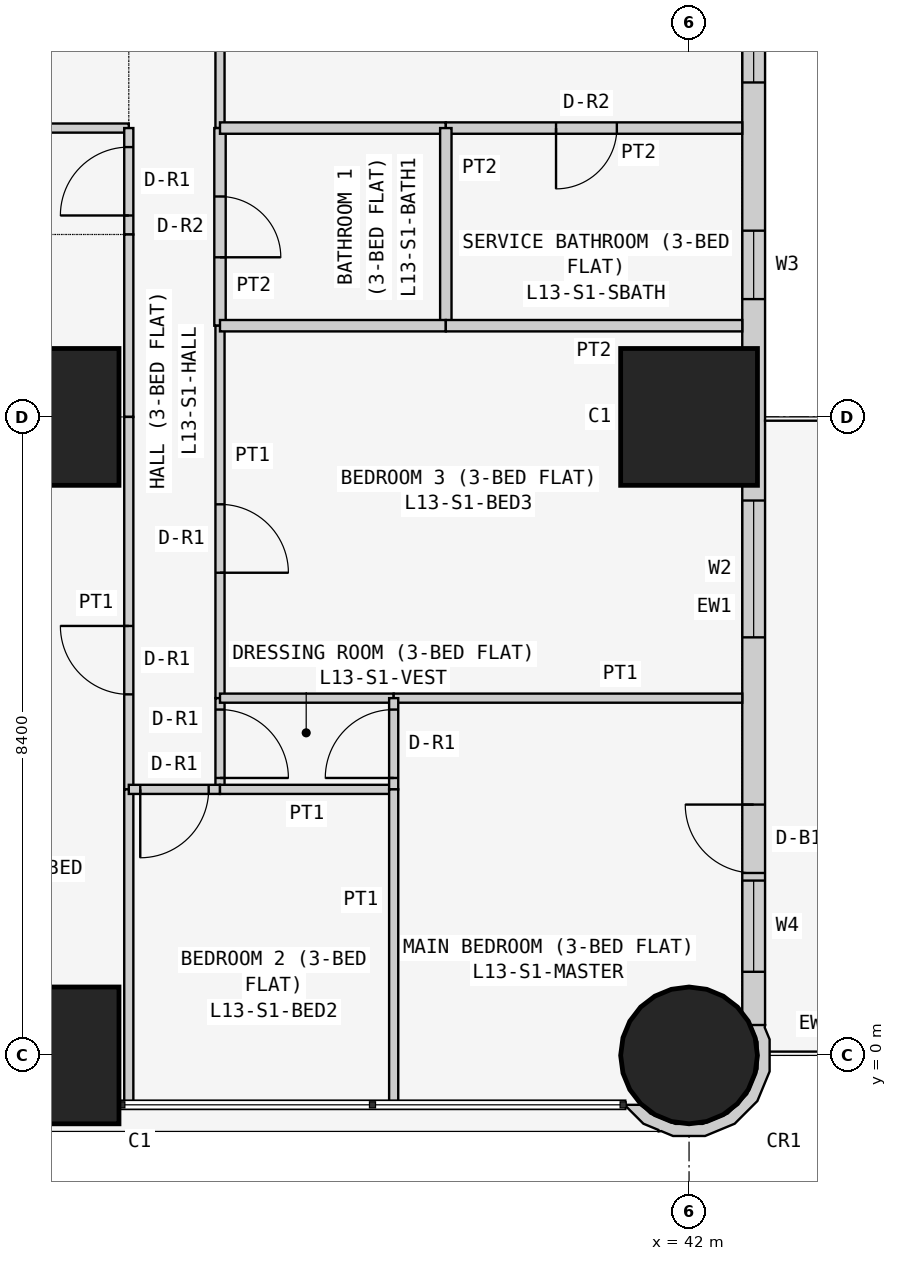
"""IFC4 building model, lengths in metres.
Left out: names, types, materials, properties, quantities, classifications, styles, units other than length and angle.
Written with IfcOpenShell. Run it as: python <this file> out.ifc"""

import sys

from ifc_helpers import new_model, si_unit, direction, frame, frame_2d, origin, origin_2d, place, context, subcontext, project, spatial, polyline, rectangle, circle, outline, extrude, element, fill, save


model = new_model("IFC4")
c1 = context("Model", 3, precision=1e-05, world=origin(), true_north=direction((0.0, 1.0)))
c2 = subcontext(c1, "Body", "Model", "MODEL_VIEW")
j1 = project(units=[si_unit("LENGTHUNIT", "METRE"), si_unit("PLANEANGLEUNIT", "RADIAN")], contexts=[c1])
p1 = place(None, origin())
s1 = spatial("IfcSite", under=j1, at=p1, CompositionType="ELEMENT")
p2 = place(p1, origin())
s2 = spatial("IfcBuilding", under=s1, at=p2, CompositionType="ELEMENT")
p3 = place(p2, frame((0.0, 0.0, 56.1)))
s3 = spatial("IfcBuildingStorey", under=s2, at=p3, CompositionType="ELEMENT", Elevation=56.1)
for number, where, z_axis, x_axis in (
    (1, (33.6, 0.0, 0.0), (0.0, 0.0, 1.0), (1.0, 0.0, 0.0)),
    (2, (33.6, 8.4, 0.0), (0.0, 0.0, 1.0), (1.0, 0.0, 0.0)),
):
    element("IfcColumn", number, at=place(p3, frame(where, z_axis=z_axis, x_axis=x_axis)), inside=s3, PredefinedType="COLUMN", context=c2, shape_type="SweptSolid", body=[
        extrude(rectangle(XDim=1.8, YDim=1.8, at=origin_2d()), origin(), (0.0, 0.0, 1.0), 3.6),
    ])
p4 = place(p3, frame((42.0, 0.0, 0.0), z_axis=(0.0, 0.0, 1.0), x_axis=(1.0, 0.0, 0.0)))
e3 = element("IfcColumn", 3, at=p4, inside=s3, PredefinedType="COLUMN", context=c2, shape_type="SweptSolid", body=[
    extrude(circle(Radius=0.9, at=origin_2d()), origin(), (0.0, 0.0, 1.0), 3.6),
])
p5 = place(p3, frame((42.0, 8.4, 0.0), z_axis=(0.0, 0.0, 1.0), x_axis=(1.0, 0.0, 0.0)))
e4 = element("IfcColumn", 4, at=p5, inside=s3, PredefinedType="COLUMN", context=c2, shape_type="SweptSolid", body=[
    extrude(rectangle(XDim=1.8, YDim=1.8, at=origin_2d()), origin(), (0.0, 0.0, 1.0), 3.6),
])
p6 = place(p3, frame((42.85, 0.4, 0.0), z_axis=(0.0, 0.0, 1.0), x_axis=(0.0, 1.0, 0.0)))
e5 = element("IfcWall", 5, at=p6, inside=s3, PredefinedType="SOLIDWALL", context=c2, shape_type="SweptSolid", body=[
    extrude(rectangle(XDim=15.7, YDim=0.3, at=frame_2d((7.85, 0.0))), origin(), (0.0, 0.0, 1.0), 3.45),
])
p7 = place(p6, frame((12.4, 0.0, 0.9)))
e6 = element("IfcOpeningElement", 6, at=p7, cuts=e5, PredefinedType="OPENING", context=c2, shape_type="SweptSolid", body=[
    extrude(rectangle(XDim=1.8, YDim=1.5, at=frame_2d((0.9, 0.75))), frame((0.0, 0.16, 0.0), z_axis=(0.0, -1.0, 0.0), x_axis=(1.0, 0.0, 0.0)), (0.0, 0.0, 1.0), 0.32),
])
p8 = place(p6, frame((9.55, 0.0, 1.5)))
e7 = element("IfcOpeningElement", 7, at=p8, cuts=e5, PredefinedType="OPENING", context=c2, shape_type="SweptSolid", body=[
    extrude(rectangle(XDim=0.9, YDim=0.7, at=frame_2d((0.45, 0.35))), frame((0.0, 0.16, 0.0), z_axis=(0.0, -1.0, 0.0), x_axis=(1.0, 0.0, 0.0)), (0.0, 0.0, 1.0), 0.32),
])
p9 = place(p6, frame((5.1, 0.0, 0.9)))
e8 = element("IfcOpeningElement", 8, at=p9, cuts=e5, PredefinedType="OPENING", context=c2, shape_type="SweptSolid", body=[
    extrude(rectangle(XDim=1.8, YDim=1.5, at=frame_2d((0.9, 0.75))), frame((0.0, 0.16, 0.0), z_axis=(0.0, -1.0, 0.0), x_axis=(1.0, 0.0, 0.0)), (0.0, 0.0, 1.0), 0.32),
])
p10 = place(p6, frame((2.0, 0.0, 0.0)))
e9 = element("IfcOpeningElement", 9, at=p10, cuts=e5, PredefinedType="OPENING", context=c2, shape_type="SweptSolid", body=[
    extrude(rectangle(XDim=0.9, YDim=2.4, at=frame_2d((0.45, 1.2))), frame((0.0, 0.16, 0.0), z_axis=(0.0, -1.0, 0.0), x_axis=(1.0, 0.0, 0.0)), (0.0, 0.0, 1.0), 0.32),
])
p11 = place(p6, frame((0.7, 0.0, 0.9)))
e10 = element("IfcOpeningElement", 10, at=p11, cuts=e5, PredefinedType="OPENING", context=c2, shape_type="SweptSolid", body=[
    extrude(rectangle(XDim=1.2, YDim=1.5, at=frame_2d((0.6, 0.75))), frame((0.0, 0.16, 0.0), z_axis=(0.0, -1.0, 0.0), x_axis=(1.0, 0.0, 0.0)), (0.0, 0.0, 1.0), 0.32),
])
p12 = place(p3, frame((41.233, -0.611, 0.0), z_axis=(0.0, 0.0, 1.0), x_axis=(0.377204953059, -0.926129809145, 0.0)))
e11 = element("IfcWall", 11, at=p12, inside=s3, PredefinedType="SOLIDWALL", context=c2, shape_type="SweptSolid", body=[
    extrude(outline(polyline([(0.319, 1.843), (-0.072, 2.001), (-0.24, 2.001), (-0.269, 2.017), (-0.37, 1.841), (-0.102, 1.842), (0.23, 1.707), (0.485, 1.455), (0.624, 1.125), (0.626, 0.766), (0.49, 0.434), (0.239, 0.179), (0.09, 0.117), (0.011, -0.078), (0.024, -0.083), (0.33, 0.045), (0.48, 0.197), (0.499, 0.193), (0.508, 0.225), (0.626, 0.345), (0.785, 0.736), (0.782, 1.157), (0.619, 1.546), (0.319, 1.843)])), origin(), (0.0, 0.0, 1.0), 3.45),
])
p13 = place(p3, frame((29.4, 12.2, 0.0), z_axis=(0.0, 0.0, 1.0), x_axis=(1.0, 0.0, 0.0)))
e12 = element("IfcWall", 12, at=p13, inside=s3, PredefinedType="PARTITIONING", context=c2, shape_type="SweptSolid", body=[
    extrude(rectangle(XDim=5.229, YDim=0.12, at=frame_2d((2.615, 0.0))), origin(), (0.0, 0.0, 1.0), 3.45),
])
p14 = place(p3, frame((34.629, 10.8, 0.0), z_axis=(0.0, 0.0, 1.0), x_axis=(0.0, 1.0, 0.0)))
e13 = element("IfcWall", 13, at=p14, inside=s3, PredefinedType="PARTITIONING", context=c2, shape_type="SweptSolid", body=[
    extrude(rectangle(XDim=1.4, YDim=0.12, at=frame_2d((0.7, 0.0))), origin(), (0.0, 0.0, 1.0), 3.45),
])
p15 = place(p14, frame((0.25, 0.0, 0.0)))
e14 = element("IfcOpeningElement", 14, at=p15, cuts=e13, PredefinedType="OPENING", context=c2, shape_type="SweptSolid", body=[
    extrude(rectangle(XDim=0.9, YDim=2.1, at=frame_2d((0.45, 1.05))), frame((0.0, 0.07, 0.0), z_axis=(0.0, -1.0, 0.0), x_axis=(1.0, 0.0, 0.0)), (0.0, 0.0, 1.0), 0.14),
])
p16 = place(p3, frame((34.629, 8.4, 0.0), z_axis=(0.0, 0.0, 1.0), x_axis=(0.0, 1.0, 0.0)))
e15 = element("IfcWall", 15, at=p16, inside=s3, PredefinedType="PARTITIONING", context=c2, shape_type="SweptSolid", body=[
    extrude(rectangle(XDim=2.4, YDim=0.12, at=frame_2d((1.2, 0.0))), origin(), (0.0, 0.0, 1.0), 3.45),
])
p17 = place(p3, frame((34.629, 3.5, 0.0), z_axis=(0.0, 0.0, 1.0), x_axis=(0.0, 1.0, 0.0)))
e16 = element("IfcWall", 16, at=p17, inside=s3, PredefinedType="PARTITIONING", context=c2, shape_type="SweptSolid", body=[
    extrude(rectangle(XDim=4.9, YDim=0.12, at=frame_2d((2.45, 0.0))), origin(), (0.0, 0.0, 1.0), 3.45),
])
p18 = place(p17, frame((1.25, 0.0, 0.0)))
e17 = element("IfcOpeningElement", 17, at=p18, cuts=e16, PredefinedType="OPENING", context=c2, shape_type="SweptSolid", body=[
    extrude(rectangle(XDim=0.9, YDim=2.1, at=frame_2d((0.45, 1.05))), frame((0.0, 0.07, 0.0), z_axis=(0.0, -1.0, 0.0), x_axis=(1.0, 0.0, 0.0)), (0.0, 0.0, 1.0), 0.14),
])
p19 = place(p3, frame((34.629, -0.65, 0.0), z_axis=(0.0, 0.0, 1.0), x_axis=(0.0, 1.0, 0.0)))
e18 = element("IfcWall", 18, at=p19, inside=s3, PredefinedType="PARTITIONING", context=c2, shape_type="SweptSolid", body=[
    extrude(rectangle(XDim=4.15, YDim=0.12, at=frame_2d((2.075, 0.0))), origin(), (0.0, 0.0, 1.0), 3.45),
])
p20 = place(p3, frame((35.829, 12.2, 0.0), z_axis=(0.0, 0.0, 1.0), x_axis=(0.0, 1.0, 0.0)))
e19 = element("IfcWall", 19, at=p20, inside=s3, PredefinedType="PARTITIONING", context=c2, shape_type="SweptSolid", body=[
    extrude(rectangle(XDim=3.575, YDim=0.12, at=frame_2d((1.788, 0.0))), origin(), (0.0, 0.0, 1.0), 3.45),
])
p21 = place(p20, frame((1.35, 0.0, 0.0)))
e20 = element("IfcOpeningElement", 20, at=p21, cuts=e19, PredefinedType="OPENING", context=c2, shape_type="SweptSolid", body=[
    extrude(rectangle(XDim=0.9, YDim=2.1, at=frame_2d((0.45, 1.05))), frame((0.0, 0.07, 0.0), z_axis=(0.0, -1.0, 0.0), x_axis=(1.0, 0.0, 0.0)), (0.0, 0.0, 1.0), 0.14),
])
p22 = place(p3, frame((35.829, 9.6, 0.0), z_axis=(0.0, 0.0, 1.0), x_axis=(0.0, 1.0, 0.0)))
e21 = element("IfcWall", 21, at=p22, inside=s3, PredefinedType="PARTITIONING", context=c2, shape_type="SweptSolid", body=[
    extrude(rectangle(XDim=2.6, YDim=0.15, at=frame_2d((1.3, 0.0))), origin(), (0.0, 0.0, 1.0), 3.45),
])
p23 = place(p22, frame((0.9, 0.0, 0.0)))
e22 = element("IfcOpeningElement", 22, at=p23, cuts=e21, PredefinedType="OPENING", context=c2, shape_type="SweptSolid", body=[
    extrude(rectangle(XDim=0.8, YDim=2.1, at=frame_2d((0.4, 1.05))), frame((0.0, 0.085, 0.0), z_axis=(0.0, -1.0, 0.0), x_axis=(1.0, 0.0, 0.0)), (0.0, 0.0, 1.0), 0.17),
])
p24 = place(p3, frame((35.829, 4.7, 0.0), z_axis=(0.0, 0.0, 1.0), x_axis=(0.0, 1.0, 0.0)))
e23 = element("IfcWall", 23, at=p24, inside=s3, PredefinedType="PARTITIONING", context=c2, shape_type="SweptSolid", body=[
    extrude(rectangle(XDim=4.9, YDim=0.12, at=frame_2d((2.45, 0.0))), origin(), (0.0, 0.0, 1.0), 3.45),
])
p25 = place(p24, frame((1.65, 0.0, 0.0)))
e24 = element("IfcOpeningElement", 24, at=p25, cuts=e23, PredefinedType="OPENING", context=c2, shape_type="SweptSolid", body=[
    extrude(rectangle(XDim=0.9, YDim=2.1, at=frame_2d((0.45, 1.05))), frame((0.0, 0.07, 0.0), z_axis=(0.0, -1.0, 0.0), x_axis=(1.0, 0.0, 0.0)), (0.0, 0.0, 1.0), 0.14),
])
p26 = place(p3, frame((35.829, 3.5, 0.0), z_axis=(0.0, 0.0, 1.0), x_axis=(0.0, 1.0, 0.0)))
e25 = element("IfcWall", 25, at=p26, inside=s3, PredefinedType="PARTITIONING", context=c2, shape_type="SweptSolid", body=[
    extrude(rectangle(XDim=1.2, YDim=0.12, at=frame_2d((0.6, 0.0))), origin(), (0.0, 0.0, 1.0), 3.45),
])
p27 = place(p26, frame((0.15, 0.0, 0.0)))
e26 = element("IfcOpeningElement", 26, at=p27, cuts=e25, PredefinedType="OPENING", context=c2, shape_type="SweptSolid", body=[
    extrude(rectangle(XDim=0.9, YDim=2.1, at=frame_2d((0.45, 1.05))), frame((0.0, 0.07, 0.0), z_axis=(0.0, -1.0, 0.0), x_axis=(1.0, 0.0, 0.0)), (0.0, 0.0, 1.0), 0.14),
])
p28 = place(p3, frame((34.629, 3.5, 0.0), z_axis=(0.0, 0.0, 1.0), x_axis=(1.0, 0.0, 0.0)))
e27 = element("IfcWall", 27, at=p28, inside=s3, PredefinedType="PARTITIONING", context=c2, shape_type="SweptSolid", body=[
    extrude(rectangle(XDim=1.2, YDim=0.12, at=frame_2d((0.6, 0.0))), origin(), (0.0, 0.0, 1.0), 3.45),
])
p29 = place(p28, frame((0.151, 0.0, 0.0)))
e28 = element("IfcOpeningElement", 28, at=p29, cuts=e27, PredefinedType="OPENING", context=c2, shape_type="SweptSolid", body=[
    extrude(rectangle(XDim=0.9, YDim=2.1, at=frame_2d((0.45, 1.05))), frame((0.0, 0.07, 0.0), z_axis=(0.0, -1.0, 0.0), x_axis=(1.0, 0.0, 0.0)), (0.0, 0.0, 1.0), 0.14),
])
p30 = place(p3, frame((35.829, 12.2, 0.0), z_axis=(0.0, 0.0, 1.0), x_axis=(1.0, 0.0, 0.0)))
e29 = element("IfcWall", 29, at=p30, inside=s3, PredefinedType="PARTITIONING", context=c2, shape_type="SweptSolid", body=[
    extrude(rectangle(XDim=2.971, YDim=0.15, at=frame_2d((1.485, 0.0))), origin(), (0.0, 0.0, 1.0), 3.45),
])
p31 = place(p3, frame((38.8, 12.2, 0.0), z_axis=(0.0, 0.0, 1.0), x_axis=(1.0, 0.0, 0.0)))
e30 = element("IfcWall", 30, at=p31, inside=s3, PredefinedType="PARTITIONING", context=c2, shape_type="SweptSolid", body=[
    extrude(rectangle(XDim=3.9, YDim=0.15, at=frame_2d((1.95, 0.0))), origin(), (0.0, 0.0, 1.0), 3.45),
])
p32 = place(p31, frame((1.45, 0.0, 0.0)))
e31 = element("IfcOpeningElement", 31, at=p32, cuts=e30, PredefinedType="OPENING", context=c2, shape_type="SweptSolid", body=[
    extrude(rectangle(XDim=0.8, YDim=2.1, at=frame_2d((0.4, 1.05))), frame((0.0, 0.085, 0.0), z_axis=(0.0, -1.0, 0.0), x_axis=(1.0, 0.0, 0.0)), (0.0, 0.0, 1.0), 0.17),
])
p33 = place(p3, frame((38.8, 9.6, 0.0), z_axis=(0.0, 0.0, 1.0), x_axis=(0.0, 1.0, 0.0)))
e32 = element("IfcWall", 32, at=p33, inside=s3, PredefinedType="PARTITIONING", context=c2, shape_type="SweptSolid", body=[
    extrude(rectangle(XDim=2.6, YDim=0.15, at=frame_2d((1.3, 0.0))), origin(), (0.0, 0.0, 1.0), 3.45),
])
p34 = place(p3, frame((35.829, 9.6, 0.0), z_axis=(0.0, 0.0, 1.0), x_axis=(1.0, 0.0, 0.0)))
e33 = element("IfcWall", 33, at=p34, inside=s3, PredefinedType="PARTITIONING", context=c2, shape_type="SweptSolid", body=[
    extrude(rectangle(XDim=2.971, YDim=0.15, at=frame_2d((1.485, 0.0))), origin(), (0.0, 0.0, 1.0), 3.45),
])
p35 = place(p3, frame((38.8, 9.6, 0.0), z_axis=(0.0, 0.0, 1.0), x_axis=(1.0, 0.0, 0.0)))
e34 = element("IfcWall", 34, at=p35, inside=s3, PredefinedType="PARTITIONING", context=c2, shape_type="SweptSolid", body=[
    extrude(rectangle(XDim=3.9, YDim=0.15, at=frame_2d((1.95, 0.0))), origin(), (0.0, 0.0, 1.0), 3.45),
])
p36 = place(p3, frame((35.829, 4.7, 0.0), z_axis=(0.0, 0.0, 1.0), x_axis=(1.0, 0.0, 0.0)))
e35 = element("IfcWall", 35, at=p36, inside=s3, PredefinedType="PARTITIONING", context=c2, shape_type="SweptSolid", body=[
    extrude(rectangle(XDim=2.285, YDim=0.12, at=frame_2d((1.143, 0.0))), origin(), (0.0, 0.0, 1.0), 3.45),
])
p37 = place(p3, frame((38.114, 4.7, 0.0), z_axis=(0.0, 0.0, 1.0), x_axis=(1.0, 0.0, 0.0)))
e36 = element("IfcWall", 36, at=p37, inside=s3, PredefinedType="PARTITIONING", context=c2, shape_type="SweptSolid", body=[
    extrude(rectangle(XDim=4.586, YDim=0.12, at=frame_2d((2.293, 0.0))), origin(), (0.0, 0.0, 1.0), 3.45),
])
p38 = place(p3, frame((35.829, 3.5, 0.0), z_axis=(0.0, 0.0, 1.0), x_axis=(1.0, 0.0, 0.0)))
e37 = element("IfcWall", 37, at=p38, inside=s3, PredefinedType="PARTITIONING", context=c2, shape_type="SweptSolid", body=[
    extrude(rectangle(XDim=2.285, YDim=0.12, at=frame_2d((1.143, 0.0))), origin(), (0.0, 0.0, 1.0), 3.45),
])
p39 = place(p3, frame((38.114, 3.5, 0.0), z_axis=(0.0, 0.0, 1.0), x_axis=(0.0, 1.0, 0.0)))
e38 = element("IfcWall", 38, at=p39, inside=s3, PredefinedType="PARTITIONING", context=c2, shape_type="SweptSolid", body=[
    extrude(rectangle(XDim=1.2, YDim=0.12, at=frame_2d((0.6, 0.0))), origin(), (0.0, 0.0, 1.0), 3.45),
])
p40 = place(p39, frame((0.15, 0.0, 0.0)))
e39 = element("IfcOpeningElement", 39, at=p40, cuts=e38, PredefinedType="OPENING", context=c2, shape_type="SweptSolid", body=[
    extrude(rectangle(XDim=0.9, YDim=2.1, at=frame_2d((0.45, 1.05))), frame((0.0, 0.07, 0.0), z_axis=(0.0, -1.0, 0.0), x_axis=(1.0, 0.0, 0.0)), (0.0, 0.0, 1.0), 0.14),
])
p41 = place(p3, frame((38.114, -0.65, 0.0), z_axis=(0.0, 0.0, 1.0), x_axis=(0.0, 1.0, 0.0)))
e40 = element("IfcWall", 40, at=p41, inside=s3, PredefinedType="PARTITIONING", context=c2, shape_type="SweptSolid", body=[
    extrude(rectangle(XDim=4.15, YDim=0.12, at=frame_2d((2.075, 0.0))), origin(), (0.0, 0.0, 1.0), 3.45),
])
p42 = place(p7, origin())
e41 = element("IfcWindow", 41, at=p42, inside=s3, PartitioningType="SINGLE_PANEL", PredefinedType="WINDOW", context=c2, shape_type="SweptSolid", body=[
    extrude(rectangle(XDim=1.8, YDim=1.5, at=frame_2d((0.9, 0.75))), frame((0.0, 0.03, 0.0), z_axis=(0.0, -1.0, 0.0), x_axis=(1.0, 0.0, 0.0)), (0.0, 0.0, 1.0), 0.06),
])
fill(e6, e41)
p43 = place(p8, origin())
e42 = element("IfcWindow", 42, at=p43, inside=s3, PartitioningType="SINGLE_PANEL", PredefinedType="WINDOW", context=c2, shape_type="SweptSolid", body=[
    extrude(rectangle(XDim=0.9, YDim=0.7, at=frame_2d((0.45, 0.35))), frame((0.0, 0.03, 0.0), z_axis=(0.0, -1.0, 0.0), x_axis=(1.0, 0.0, 0.0)), (0.0, 0.0, 1.0), 0.06),
])
fill(e7, e42)
p44 = place(p9, origin())
e43 = element("IfcWindow", 43, at=p44, inside=s3, PartitioningType="SINGLE_PANEL", PredefinedType="WINDOW", context=c2, shape_type="SweptSolid", body=[
    extrude(rectangle(XDim=1.8, YDim=1.5, at=frame_2d((0.9, 0.75))), frame((0.0, 0.03, 0.0), z_axis=(0.0, -1.0, 0.0), x_axis=(1.0, 0.0, 0.0)), (0.0, 0.0, 1.0), 0.06),
])
fill(e8, e43)
p45 = place(p10, origin())
e44 = element("IfcDoor", 44, at=p45, inside=s3, OperationType="SINGLE_SWING_RIGHT", PredefinedType="DOOR", context=c2, shape_type="SweptSolid", body=[
    extrude(rectangle(XDim=0.9, YDim=2.4, at=frame_2d((0.45, 1.2))), frame((0.0, 0.025, 0.0), z_axis=(0.0, -1.0, 0.0), x_axis=(1.0, 0.0, 0.0)), (0.0, 0.0, 1.0), 0.05),
])
fill(e9, e44)
p46 = place(p11, origin())
e45 = element("IfcWindow", 45, at=p46, inside=s3, PartitioningType="SINGLE_PANEL", PredefinedType="WINDOW", context=c2, shape_type="SweptSolid", body=[
    extrude(rectangle(XDim=1.2, YDim=1.5, at=frame_2d((0.6, 0.75))), frame((0.0, 0.03, 0.0), z_axis=(0.0, -1.0, 0.0), x_axis=(1.0, 0.0, 0.0)), (0.0, 0.0, 1.0), 0.06),
])
fill(e10, e45)
p47 = place(p15, origin())
e46 = element("IfcDoor", 46, at=p47, inside=s3, OperationType="SINGLE_SWING_LEFT", PredefinedType="DOOR", context=c2, shape_type="SweptSolid", body=[
    extrude(rectangle(XDim=0.9, YDim=2.1, at=frame_2d((0.45, 1.05))), frame((0.0, 0.025, 0.0), z_axis=(0.0, -1.0, 0.0), x_axis=(1.0, 0.0, 0.0)), (0.0, 0.0, 1.0), 0.05),
])
fill(e14, e46)
p48 = place(p18, origin())
e47 = element("IfcDoor", 47, at=p48, inside=s3, OperationType="SINGLE_SWING_RIGHT", PredefinedType="DOOR", context=c2, shape_type="SweptSolid", body=[
    extrude(rectangle(XDim=0.9, YDim=2.1, at=frame_2d((0.45, 1.05))), frame((0.0, 0.025, 0.0), z_axis=(0.0, -1.0, 0.0), x_axis=(1.0, 0.0, 0.0)), (0.0, 0.0, 1.0), 0.05),
])
fill(e17, e47)
p49 = place(p32, frame((0.8, 0.0, 0.0), z_axis=(0.0, 0.0, 1.0), x_axis=(-1.0, 0.0, 0.0)))
e48 = element("IfcDoor", 48, at=p49, inside=s3, OperationType="SINGLE_SWING_RIGHT", PredefinedType="DOOR", context=c2, shape_type="SweptSolid", body=[
    extrude(rectangle(XDim=0.8, YDim=2.1, at=frame_2d((0.4, 1.05))), frame((0.0, 0.025, 0.0), z_axis=(0.0, -1.0, 0.0), x_axis=(1.0, 0.0, 0.0)), (0.0, 0.0, 1.0), 0.05),
])
fill(e31, e48)
p50 = place(p23, frame((0.8, 0.0, 0.0), z_axis=(0.0, 0.0, 1.0), x_axis=(-1.0, 0.0, 0.0)))
e49 = element("IfcDoor", 49, at=p50, inside=s3, OperationType="SINGLE_SWING_RIGHT", PredefinedType="DOOR", context=c2, shape_type="SweptSolid", body=[
    extrude(rectangle(XDim=0.8, YDim=2.1, at=frame_2d((0.4, 1.05))), frame((0.0, 0.025, 0.0), z_axis=(0.0, -1.0, 0.0), x_axis=(1.0, 0.0, 0.0)), (0.0, 0.0, 1.0), 0.05),
])
fill(e22, e49)
p51 = place(p25, frame((0.9, 0.0, 0.0), z_axis=(0.0, 0.0, 1.0), x_axis=(-1.0, 0.0, 0.0)))
e50 = element("IfcDoor", 50, at=p51, inside=s3, OperationType="SINGLE_SWING_RIGHT", PredefinedType="DOOR", context=c2, shape_type="SweptSolid", body=[
    extrude(rectangle(XDim=0.9, YDim=2.1, at=frame_2d((0.45, 1.05))), frame((0.0, 0.025, 0.0), z_axis=(0.0, -1.0, 0.0), x_axis=(1.0, 0.0, 0.0)), (0.0, 0.0, 1.0), 0.05),
])
fill(e24, e50)
p52 = place(p27, frame((0.9, 0.0, 0.0), z_axis=(0.0, 0.0, 1.0), x_axis=(-1.0, 0.0, 0.0)))
e51 = element("IfcDoor", 51, at=p52, inside=s3, OperationType="SINGLE_SWING_RIGHT", PredefinedType="DOOR", context=c2, shape_type="SweptSolid", body=[
    extrude(rectangle(XDim=0.9, YDim=2.1, at=frame_2d((0.45, 1.05))), frame((0.0, 0.025, 0.0), z_axis=(0.0, -1.0, 0.0), x_axis=(1.0, 0.0, 0.0)), (0.0, 0.0, 1.0), 0.05),
])
fill(e26, e51)
p53 = place(p40, origin())
e52 = element("IfcDoor", 52, at=p53, inside=s3, OperationType="SINGLE_SWING_LEFT", PredefinedType="DOOR", context=c2, shape_type="SweptSolid", body=[
    extrude(rectangle(XDim=0.9, YDim=2.1, at=frame_2d((0.45, 1.05))), frame((0.0, 0.025, 0.0), z_axis=(0.0, -1.0, 0.0), x_axis=(1.0, 0.0, 0.0)), (0.0, 0.0, 1.0), 0.05),
])
fill(e39, e52)
p54 = place(p29, frame((0.9, 0.0, 0.0), z_axis=(0.0, 0.0, 1.0), x_axis=(-1.0, 0.0, 0.0)))
e53 = element("IfcDoor", 53, at=p54, inside=s3, OperationType="SINGLE_SWING_RIGHT", PredefinedType="DOOR", context=c2, shape_type="SweptSolid", body=[
    extrude(rectangle(XDim=0.9, YDim=2.1, at=frame_2d((0.45, 1.05))), frame((0.0, 0.025, 0.0), z_axis=(0.0, -1.0, 0.0), x_axis=(1.0, 0.0, 0.0)), (0.0, 0.0, 1.0), 0.05),
])
fill(e28, e53)
save(model, sys.argv[1])
